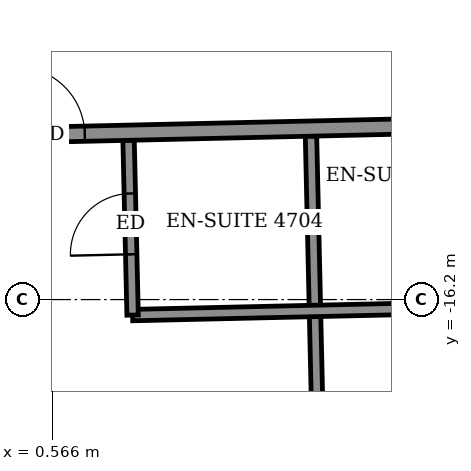
"""IFC4 building model, lengths in metres.
Left out: names, types, materials, properties, quantities, classifications, styles, units other than length and angle.
Written with IfcOpenShell. Run it as: python <this file> out.ifc"""

import sys

from ifc_helpers import new_model, si_unit, direction, frame, frame_2d, origin, place, context, subcontext, project, spatial, rectangle, extrude, element, fill, save


model = new_model("IFC4")
c1 = context("Model", 3, precision=1e-05, world=origin(), true_north=direction((0.0, 1.0)))
c2 = subcontext(c1, "Body", "Model", "MODEL_VIEW")
j1 = project(units=[si_unit("LENGTHUNIT", "METRE"), si_unit("PLANEANGLEUNIT", "RADIAN")], contexts=[c1])
p1 = place(None, origin())
s1 = spatial("IfcSite", under=j1, at=p1, CompositionType="ELEMENT")
p2 = place(p1, origin())
s2 = spatial("IfcBuilding", under=s1, at=p2, CompositionType="ELEMENT")
p3 = place(p2, frame((0.0, 0.0, 186.1)))
s3 = spatial("IfcBuildingStorey", under=s2, at=p3, CompositionType="ELEMENT", Elevation=186.1)
p4 = place(p3, frame((4.102, -19.999, 0.0), z_axis=(0.0, 0.0, 1.0), x_axis=(-0.022688785847, 0.999742576365, 0.0)))
e1 = element("IfcWall", 1, at=p4, inside=s3, PredefinedType="PARTITIONING", context=c2, shape_type="SweptSolid", body=[
    extrude(rectangle(XDim=5.95, YDim=0.15, at=frame_2d((2.975, 0.0))), origin(), (0.0, 0.0, 1.0), 2.55),
])
p5 = place(p3, frame((1.62, -16.404, 0.0), z_axis=(0.0, 0.0, 1.0), x_axis=(0.999741415159, 0.022739894798, 0.0)))
e2 = element("IfcWall", 2, at=p5, inside=s3, PredefinedType="PARTITIONING", context=c2, shape_type="SweptSolid", body=[
    extrude(rectangle(XDim=4.799, YDim=0.15, at=frame_2d((2.399, 0.0))), origin(), (0.0, 0.0, 1.0), 3.05),
])
p6 = place(p3, frame((1.62, -16.404, 0.0), z_axis=(0.0, 0.0, 1.0), x_axis=(-0.023143422514, 0.999732155127, 0.0)))
e3 = element("IfcWall", 3, at=p6, inside=s3, PredefinedType="PARTITIONING", context=c2, shape_type="SweptSolid", body=[
    extrude(rectangle(XDim=2.3, YDim=0.15, at=frame_2d((1.15, 0.0))), origin(), (0.0, 0.0, 1.0), 3.05),
])
p7 = place(p6, frame((0.8, 0.0, 0.0)))
e4 = element("IfcOpeningElement", 4, at=p7, cuts=e3, PredefinedType="OPENING", context=c2, shape_type="SweptSolid", body=[
    extrude(rectangle(XDim=0.8, YDim=2.1, at=frame_2d((0.4, 1.05))), frame((0.0, 0.085, 0.0), z_axis=(0.0, -1.0, 0.0), x_axis=(1.0, 0.0, 0.0)), (0.0, 0.0, 1.0), 0.17),
])
p8 = place(p3, frame((-21.279, -14.523, 0.0), z_axis=(0.0, 0.0, 1.0), x_axis=(0.999742878501, 0.022675468818, 0.0)))
e5 = element("IfcWall", 5, at=p8, inside=s3, PredefinedType="PARTITIONING", context=c2, shape_type="SweptSolid", body=[
    extrude(rectangle(XDim=46.48, YDim=0.2, at=frame_2d((23.24, 0.0))), origin(), (0.0, 0.0, 1.0), 3.05),
])
p9 = place(p8, frame((1.4, 0.0, 0.0)))
e6 = element("IfcOpeningElement", 6, at=p9, cuts=e5, PredefinedType="OPENING", context=c2, shape_type="SweptSolid", body=[
    extrude(rectangle(XDim=1.0, YDim=2.1, at=frame_2d((0.5, 1.05))), frame((0.0, 0.11, 0.0), z_axis=(0.0, -1.0, 0.0), x_axis=(1.0, 0.0, 0.0)), (0.0, 0.0, 1.0), 0.22),
])
p10 = place(p8, frame((5.95, 0.0, 0.0)))
e7 = element("IfcOpeningElement", 7, at=p10, cuts=e5, PredefinedType="OPENING", context=c2, shape_type="SweptSolid", body=[
    extrude(rectangle(XDim=0.9, YDim=2.1, at=frame_2d((0.45, 1.05))), frame((0.0, 0.11, 0.0), z_axis=(0.0, -1.0, 0.0), x_axis=(1.0, 0.0, 0.0)), (0.0, 0.0, 1.0), 0.22),
])
p11 = place(p8, frame((10.575, 0.0, 0.0)))
e8 = element("IfcOpeningElement", 8, at=p11, cuts=e5, PredefinedType="OPENING", context=c2, shape_type="SweptSolid", body=[
    extrude(rectangle(XDim=0.9, YDim=2.1, at=frame_2d((0.45, 1.05))), frame((0.0, 0.11, 0.0), z_axis=(0.0, -1.0, 0.0), x_axis=(1.0, 0.0, 0.0)), (0.0, 0.0, 1.0), 0.22),
])
p12 = place(p8, frame((12.625, 0.0, 0.0)))
e9 = element("IfcOpeningElement", 9, at=p12, cuts=e5, PredefinedType="OPENING", context=c2, shape_type="SweptSolid", body=[
    extrude(rectangle(XDim=0.9, YDim=2.1, at=frame_2d((0.45, 1.05))), frame((0.0, 0.11, 0.0), z_axis=(0.0, -1.0, 0.0), x_axis=(1.0, 0.0, 0.0)), (0.0, 0.0, 1.0), 0.22),
])
p13 = place(p8, frame((19.4, 0.0, 0.0)))
e10 = element("IfcOpeningElement", 10, at=p13, cuts=e5, PredefinedType="OPENING", context=c2, shape_type="SweptSolid", body=[
    extrude(rectangle(XDim=0.9, YDim=2.1, at=frame_2d((0.45, 1.05))), frame((0.0, 0.11, 0.0), z_axis=(0.0, -1.0, 0.0), x_axis=(1.0, 0.0, 0.0)), (0.0, 0.0, 1.0), 0.22),
])
p14 = place(p8, frame((21.375, 0.0, 0.0)))
e11 = element("IfcOpeningElement", 11, at=p14, cuts=e5, PredefinedType="OPENING", context=c2, shape_type="SweptSolid", body=[
    extrude(rectangle(XDim=0.9, YDim=2.1, at=frame_2d((0.45, 1.05))), frame((0.0, 0.11, 0.0), z_axis=(0.0, -1.0, 0.0), x_axis=(1.0, 0.0, 0.0)), (0.0, 0.0, 1.0), 0.22),
])
p15 = place(p8, frame((28.15, 0.0, 0.0)))
e12 = element("IfcOpeningElement", 12, at=p15, cuts=e5, PredefinedType="OPENING", context=c2, shape_type="SweptSolid", body=[
    extrude(rectangle(XDim=0.9, YDim=2.1, at=frame_2d((0.45, 1.05))), frame((0.0, 0.11, 0.0), z_axis=(0.0, -1.0, 0.0), x_axis=(1.0, 0.0, 0.0)), (0.0, 0.0, 1.0), 0.22),
])
p16 = place(p8, frame((30.1, 0.0, 0.0)))
e13 = element("IfcOpeningElement", 13, at=p16, cuts=e5, PredefinedType="OPENING", context=c2, shape_type="SweptSolid", body=[
    extrude(rectangle(XDim=0.9, YDim=2.1, at=frame_2d((0.45, 1.05))), frame((0.0, 0.11, 0.0), z_axis=(0.0, -1.0, 0.0), x_axis=(1.0, 0.0, 0.0)), (0.0, 0.0, 1.0), 0.22),
])
p17 = place(p8, frame((36.875, 0.0, 0.0)))
e14 = element("IfcOpeningElement", 14, at=p17, cuts=e5, PredefinedType="OPENING", context=c2, shape_type="SweptSolid", body=[
    extrude(rectangle(XDim=0.9, YDim=2.1, at=frame_2d((0.45, 1.05))), frame((0.0, 0.11, 0.0), z_axis=(0.0, -1.0, 0.0), x_axis=(1.0, 0.0, 0.0)), (0.0, 0.0, 1.0), 0.22),
])
p18 = place(p8, frame((43.89, 0.0, 0.0)))
e15 = element("IfcOpeningElement", 15, at=p18, cuts=e5, PredefinedType="OPENING", context=c2, shape_type="SweptSolid", body=[
    extrude(rectangle(XDim=1.0, YDim=2.1, at=frame_2d((0.5, 1.05))), frame((0.0, 0.11, 0.0), z_axis=(0.0, -1.0, 0.0), x_axis=(1.0, 0.0, 0.0)), (0.0, 0.0, 1.0), 0.22),
])
p19 = place(p8, frame((39.05, 0.0, 0.0)))
e16 = element("IfcOpeningElement", 16, at=p19, cuts=e5, PredefinedType="OPENING", context=c2, shape_type="SweptSolid", body=[
    extrude(rectangle(XDim=0.9, YDim=2.1, at=frame_2d((0.45, 1.05))), frame((0.0, 0.11, 0.0), z_axis=(0.0, -1.0, 0.0), x_axis=(1.0, 0.0, 0.0)), (0.0, 0.0, 1.0), 0.22),
])
p20 = place(p14, origin())
e17 = element("IfcDoor", 17, at=p20, inside=s3, OperationType="SINGLE_SWING_RIGHT", PredefinedType="DOOR", context=c2, shape_type="SweptSolid", body=[
    extrude(rectangle(XDim=0.9, YDim=2.1, at=frame_2d((0.45, 1.05))), frame((0.0, 0.025, 0.0), z_axis=(0.0, -1.0, 0.0), x_axis=(1.0, 0.0, 0.0)), (0.0, 0.0, 1.0), 0.05),
])
fill(e11, e17)
p21 = place(p7, origin())
e18 = element("IfcDoor", 18, at=p21, inside=s3, OperationType="SINGLE_SWING_RIGHT", PredefinedType="DOOR", context=c2, shape_type="SweptSolid", body=[
    extrude(rectangle(XDim=0.8, YDim=2.1, at=frame_2d((0.4, 1.05))), frame((0.0, 0.025, 0.0), z_axis=(0.0, -1.0, 0.0), x_axis=(1.0, 0.0, 0.0)), (0.0, 0.0, 1.0), 0.05),
])
fill(e4, e18)
save(model, sys.argv[1])
